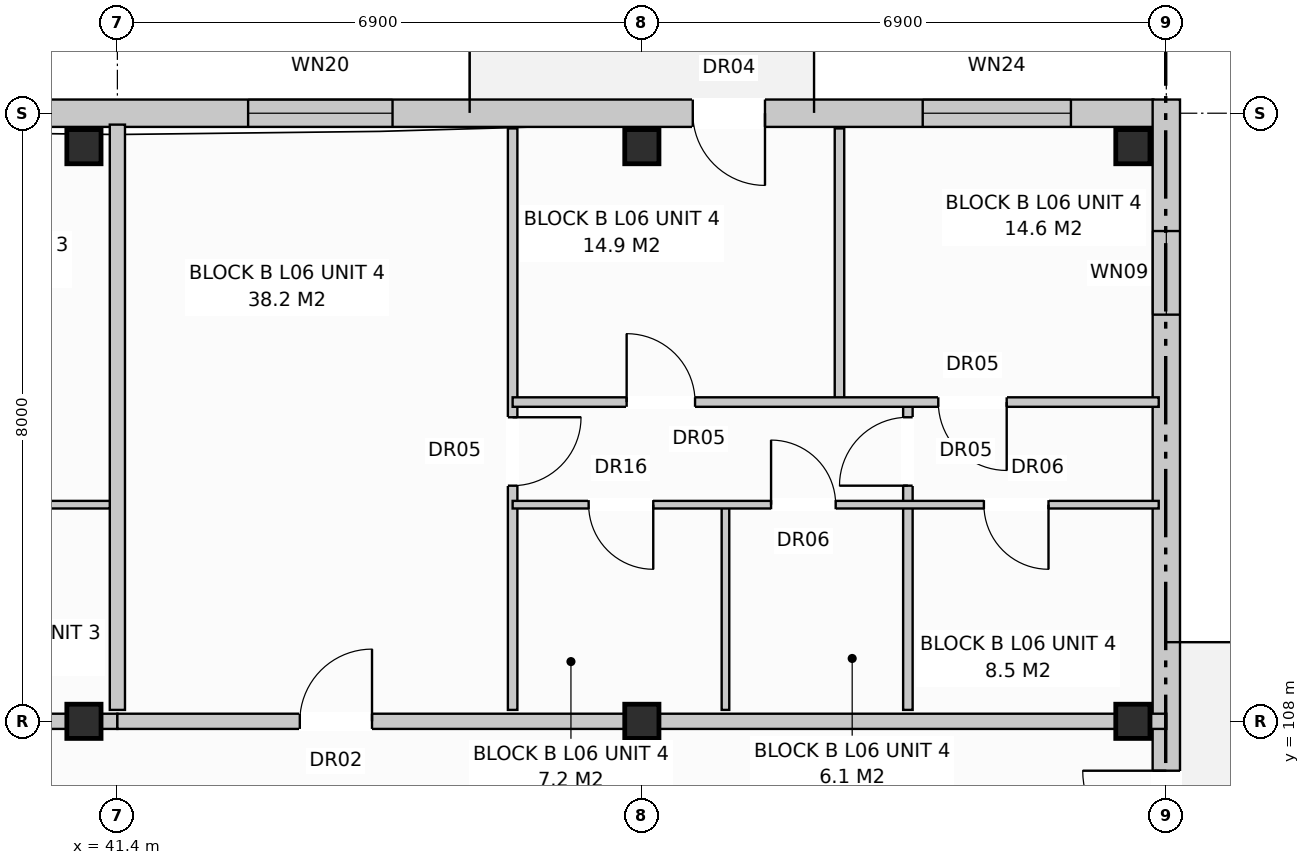
"""IFC4 building model, lengths in metres.
Left out: names, types, materials, properties, quantities, classifications, styles, units other than length and angle.
Written with IfcOpenShell. Run it as: python <this file> out.ifc"""

import sys

from ifc_helpers import new_model, si_unit, direction, frame, frame_2d, origin, origin_with_axes, origin_2d, place, context, subcontext, project, spatial, rectangle, extrude, element, fill, save


model = new_model("IFC4")
c1 = context("Model", 3, precision=1e-05, world=origin(), true_north=direction((0.0, 1.0)))
c2 = subcontext(c1, "Body", "Model", "MODEL_VIEW")
j1 = project(units=[si_unit("LENGTHUNIT", "METRE"), si_unit("PLANEANGLEUNIT", "RADIAN")], contexts=[c1])
p1 = place(None, origin())
s1 = spatial("IfcSite", under=j1, at=p1, CompositionType="ELEMENT")
p2 = place(p1, origin())
s2 = spatial("IfcBuilding", under=s1, at=p2, CompositionType="ELEMENT")
p3 = place(p2, frame((0.0, 0.0, 20.8)))
s3 = spatial("IfcBuildingStorey", under=s2, at=p3, CompositionType="ELEMENT", Elevation=20.8)
for number, where, z_axis, x_axis in (
    (1, (40.96, 108.0, 0.0), (0.0, 0.0, 1.0), (1.0, 0.0, 0.0)),
    (2, (40.96, 115.56, 0.0), (0.0, 0.0, 1.0), (1.0, 0.0, 0.0)),
    (3, (48.3, 108.0, 0.0), (0.0, 0.0, 1.0), (1.0, 0.0, 0.0)),
    (4, (48.3, 115.56, 0.0), (0.0, 0.0, 1.0), (1.0, 0.0, 0.0)),
    (5, (54.76, 108.0, 0.0), (0.0, 0.0, 1.0), (1.0, 0.0, 0.0)),
    (6, (54.76, 115.56, 0.0), (0.0, 0.0, 1.0), (1.0, 0.0, 0.0)),
):
    element("IfcColumn", number, at=place(p3, frame(where, z_axis=z_axis, x_axis=x_axis)), inside=s3, PredefinedType="COLUMN", context=c2, shape_type="SweptSolid", body=[
        extrude(rectangle(XDim=0.45, YDim=0.45, at=origin_2d()), origin(), (0.0, 0.0, 1.0), 3.2),
    ])
p4 = place(p3, frame((0.17, 116.0, 0.0), z_axis=(0.0, 0.0, 1.0), x_axis=(1.0, 0.0, 0.0)))
e7 = element("IfcWall", 7, at=p4, inside=s3, PredefinedType="STANDARD", context=c2, shape_type="SweptSolid", body=[
    extrude(rectangle(XDim=54.86, YDim=0.36, at=frame_2d((27.43, 0.0))), origin(), (0.0, 0.0, 1.0), 2.95),
])
p5 = place(p4, frame((2.804, 0.0, 0.0)))
e8 = element("IfcOpeningElement", 8, at=p5, cuts=e7, PredefinedType="OPENING", context=c2, shape_type="SweptSolid", body=[
    extrude(rectangle(XDim=0.95, YDim=2.1, at=frame_2d((0.475, 1.05))), frame((0.0, 0.192, 0.0), z_axis=(0.0, -1.0, 0.0), x_axis=(1.0, 0.0, 0.0)), (0.0, 0.0, 1.0), 0.384),
])
p6 = place(p4, frame((16.304, 0.0, 0.0)))
e9 = element("IfcOpeningElement", 9, at=p6, cuts=e7, PredefinedType="OPENING", context=c2, shape_type="SweptSolid", body=[
    extrude(rectangle(XDim=0.95, YDim=2.1, at=frame_2d((0.475, 1.05))), frame((0.0, 0.192, 0.0), z_axis=(0.0, -1.0, 0.0), x_axis=(1.0, 0.0, 0.0)), (0.0, 0.0, 1.0), 0.384),
])
p7 = place(p4, frame((30.804, 0.0, 0.0)))
e10 = element("IfcOpeningElement", 10, at=p7, cuts=e7, PredefinedType="OPENING", context=c2, shape_type="SweptSolid", body=[
    extrude(rectangle(XDim=0.95, YDim=2.1, at=frame_2d((0.475, 1.05))), frame((0.0, 0.192, 0.0), z_axis=(0.0, -1.0, 0.0), x_axis=(1.0, 0.0, 0.0)), (0.0, 0.0, 1.0), 0.384),
])
p8 = place(p4, frame((48.8, 0.0, 0.0)))
e11 = element("IfcOpeningElement", 11, at=p8, cuts=e7, PredefinedType="OPENING", context=c2, shape_type="SweptSolid", body=[
    extrude(rectangle(XDim=0.95, YDim=2.1, at=frame_2d((0.475, 1.05))), frame((0.0, 0.192, 0.0), z_axis=(0.0, -1.0, 0.0), x_axis=(1.0, 0.0, 0.0)), (0.0, 0.0, 1.0), 0.384),
])
p9 = place(p4, frame((0.65, 0.0, 0.8)))
e12 = element("IfcOpeningElement", 12, at=p9, cuts=e7, PredefinedType="OPENING", context=c2, shape_type="SweptSolid", body=[
    extrude(rectangle(XDim=1.9, YDim=1.85, at=frame_2d((0.95, 0.925))), frame((0.0, 0.192, 0.0), z_axis=(0.0, -1.0, 0.0), x_axis=(1.0, 0.0, 0.0)), (0.0, 0.0, 1.0), 0.384),
])
p10 = place(p4, frame((4.325, 0.0, 0.8)))
e13 = element("IfcOpeningElement", 13, at=p10, cuts=e7, PredefinedType="OPENING", context=c2, shape_type="SweptSolid", body=[
    extrude(rectangle(XDim=1.95, YDim=1.65, at=frame_2d((0.975, 0.825))), frame((0.0, 0.192, 0.0), z_axis=(0.0, -1.0, 0.0), x_axis=(1.0, 0.0, 0.0)), (0.0, 0.0, 1.0), 0.384),
])
p11 = place(p4, frame((10.1, 0.0, 0.8)))
e14 = element("IfcOpeningElement", 14, at=p11, cuts=e7, PredefinedType="OPENING", context=c2, shape_type="SweptSolid", body=[
    extrude(rectangle(XDim=1.8, YDim=1.7, at=frame_2d((0.9, 0.85))), frame((0.0, 0.192, 0.0), z_axis=(0.0, -1.0, 0.0), x_axis=(1.0, 0.0, 0.0)), (0.0, 0.0, 1.0), 0.384),
])
p12 = place(p4, frame((14.55, 0.0, 0.72)))
e15 = element("IfcOpeningElement", 15, at=p12, cuts=e7, PredefinedType="OPENING", context=c2, shape_type="SweptSolid", body=[
    extrude(rectangle(XDim=1.1, YDim=1.5, at=frame_2d((0.55, 0.75))), frame((0.0, 0.192, 0.0), z_axis=(0.0, -1.0, 0.0), x_axis=(1.0, 0.0, 0.0)), (0.0, 0.0, 1.0), 0.384),
])
p13 = place(p4, frame((18.025, 0.0, 0.8)))
e16 = element("IfcOpeningElement", 16, at=p13, cuts=e7, PredefinedType="OPENING", context=c2, shape_type="SweptSolid", body=[
    extrude(rectangle(XDim=1.95, YDim=1.65, at=frame_2d((0.975, 0.825))), frame((0.0, 0.192, 0.0), z_axis=(0.0, -1.0, 0.0), x_axis=(1.0, 0.0, 0.0)), (0.0, 0.0, 1.0), 0.384),
])
p14 = place(p4, frame((22.8, 0.0, 0.8)))
e17 = element("IfcOpeningElement", 17, at=p14, cuts=e7, PredefinedType="OPENING", context=c2, shape_type="SweptSolid", body=[
    extrude(rectangle(XDim=1.8, YDim=1.7, at=frame_2d((0.9, 0.85))), frame((0.0, 0.192, 0.0), z_axis=(0.0, -1.0, 0.0), x_axis=(1.0, 0.0, 0.0)), (0.0, 0.0, 1.0), 0.384),
])
p15 = place(p4, frame((28.85, 0.0, 0.72)))
e18 = element("IfcOpeningElement", 18, at=p15, cuts=e7, PredefinedType="OPENING", context=c2, shape_type="SweptSolid", body=[
    extrude(rectangle(XDim=1.1, YDim=1.5, at=frame_2d((0.55, 0.75))), frame((0.0, 0.192, 0.0), z_axis=(0.0, -1.0, 0.0), x_axis=(1.0, 0.0, 0.0)), (0.0, 0.0, 1.0), 0.384),
])
p16 = place(p4, frame((34.825, 0.0, 0.8)))
e19 = element("IfcOpeningElement", 19, at=p16, cuts=e7, PredefinedType="OPENING", context=c2, shape_type="SweptSolid", body=[
    extrude(rectangle(XDim=1.95, YDim=1.65, at=frame_2d((0.975, 0.825))), frame((0.0, 0.192, 0.0), z_axis=(0.0, -1.0, 0.0), x_axis=(1.0, 0.0, 0.0)), (0.0, 0.0, 1.0), 0.384),
])
p17 = place(p4, frame((38.3, 0.0, 0.8)))
e20 = element("IfcOpeningElement", 20, at=p17, cuts=e7, PredefinedType="OPENING", context=c2, shape_type="SweptSolid", body=[
    extrude(rectangle(XDim=1.8, YDim=1.7, at=frame_2d((0.9, 0.85))), frame((0.0, 0.192, 0.0), z_axis=(0.0, -1.0, 0.0), x_axis=(1.0, 0.0, 0.0)), (0.0, 0.0, 1.0), 0.384),
])
p18 = place(p4, frame((42.95, 0.0, 0.8)))
e21 = element("IfcOpeningElement", 21, at=p18, cuts=e7, PredefinedType="OPENING", context=c2, shape_type="SweptSolid", body=[
    extrude(rectangle(XDim=1.9, YDim=1.85, at=frame_2d((0.95, 0.925))), frame((0.0, 0.192, 0.0), z_axis=(0.0, -1.0, 0.0), x_axis=(1.0, 0.0, 0.0)), (0.0, 0.0, 1.0), 0.384),
])
p19 = place(p4, frame((51.825, 0.0, 0.8)))
e22 = element("IfcOpeningElement", 22, at=p19, cuts=e7, PredefinedType="OPENING", context=c2, shape_type="SweptSolid", body=[
    extrude(rectangle(XDim=1.95, YDim=1.65, at=frame_2d((0.975, 0.825))), frame((0.0, 0.192, 0.0), z_axis=(0.0, -1.0, 0.0), x_axis=(1.0, 0.0, 0.0)), (0.0, 0.0, 1.0), 0.384),
])
p20 = place(p3, frame((55.2, 97.42, 0.0), z_axis=(0.0, 0.0, 1.0), x_axis=(0.0, 1.0, 0.0)))
e23 = element("IfcWall", 23, at=p20, inside=s3, PredefinedType="STANDARD", context=c2, shape_type="SweptSolid", body=[
    extrude(rectangle(XDim=18.76, YDim=0.36, at=frame_2d((9.38, 0.0))), origin(), (0.0, 0.0, 1.0), 2.95),
])
p21 = place(p20, frame((8.83, 0.0, 0.0)))
e24 = element("IfcOpeningElement", 24, at=p21, cuts=e23, PredefinedType="OPENING", context=c2, shape_type="SweptSolid", body=[
    extrude(rectangle(XDim=1.1, YDim=2.1, at=frame_2d((0.55, 1.05))), frame((0.0, 0.192, 0.0), z_axis=(0.0, -1.0, 0.0), x_axis=(1.0, 0.0, 0.0)), (0.0, 0.0, 1.0), 0.384),
])
p22 = place(p20, frame((1.73, 0.0, 0.72)))
e25 = element("IfcOpeningElement", 25, at=p22, cuts=e23, PredefinedType="OPENING", context=c2, shape_type="SweptSolid", body=[
    extrude(rectangle(XDim=1.1, YDim=1.5, at=frame_2d((0.55, 0.75))), frame((0.0, 0.192, 0.0), z_axis=(0.0, -1.0, 0.0), x_axis=(1.0, 0.0, 0.0)), (0.0, 0.0, 1.0), 0.384),
])
p23 = place(p20, frame((15.93, 0.0, 0.72)))
e26 = element("IfcOpeningElement", 26, at=p23, cuts=e23, PredefinedType="OPENING", context=c2, shape_type="SweptSolid", body=[
    extrude(rectangle(XDim=1.1, YDim=1.5, at=frame_2d((0.55, 0.75))), frame((0.0, 0.192, 0.0), z_axis=(0.0, -1.0, 0.0), x_axis=(1.0, 0.0, 0.0)), (0.0, 0.0, 1.0), 0.384),
])
p24 = place(p3, frame((41.4, 108.15, 0.0), z_axis=(0.0, 0.0, 1.0), x_axis=(0.0, 1.0, 0.0)))
e27 = element("IfcWall", 27, at=p24, inside=s3, PredefinedType="PARTITIONING", context=c2, shape_type="SweptSolid", body=[
    extrude(rectangle(XDim=7.7, YDim=0.2, at=frame_2d((3.85, 0.0))), origin(), (0.0, 0.0, 1.0), 2.39),
])
p25 = place(p3, frame((20.7, 108.0, 0.0), z_axis=(0.0, 0.0, 1.0), x_axis=(1.0, 0.0, 0.0)))
e28 = element("IfcWall", 28, at=p25, inside=s3, PredefinedType="PARTITIONING", context=c2, shape_type="SweptSolid", body=[
    extrude(rectangle(XDim=20.7, YDim=0.2, at=frame_2d((10.35, 0.0))), origin(), (0.0, 0.0, 1.0), 2.39),
])
p26 = place(p25, frame((2.4, 0.0, 0.0)))
e29 = element("IfcOpeningElement", 29, at=p26, cuts=e28, PredefinedType="OPENING", context=c2, shape_type="SweptSolid", body=[
    extrude(rectangle(XDim=0.95, YDim=2.15, at=frame_2d((0.475, 1.075))), frame((0.0, 0.112, 0.0), z_axis=(0.0, -1.0, 0.0), x_axis=(1.0, 0.0, 0.0)), (0.0, 0.0, 1.0), 0.224),
])
p27 = place(p3, frame((27.0, 110.85, 0.0), z_axis=(0.0, 0.0, 1.0), x_axis=(1.0, 0.0, 0.0)))
e30 = element("IfcWall", 30, at=p27, inside=s3, PredefinedType="PARTITIONING", context=c2, shape_type="SweptSolid", body=[
    extrude(rectangle(XDim=14.3, YDim=0.1, at=frame_2d((7.15, 0.0))), origin(), (0.0, 0.0, 1.0), 2.95),
])
p28 = place(p27, frame((1.6, 0.0, 0.0)))
e31 = element("IfcOpeningElement", 31, at=p28, cuts=e30, PredefinedType="OPENING", context=c2, shape_type="SweptSolid", body=[
    extrude(rectangle(XDim=0.9, YDim=2.1, at=frame_2d((0.45, 1.05))), frame((0.0, 0.062, 0.0), z_axis=(0.0, -1.0, 0.0), x_axis=(1.0, 0.0, 0.0)), (0.0, 0.0, 1.0), 0.124),
])
p29 = place(p27, frame((5.1, 0.0, 0.0)))
e32 = element("IfcOpeningElement", 32, at=p29, cuts=e30, PredefinedType="OPENING", context=c2, shape_type="SweptSolid", body=[
    extrude(rectangle(XDim=0.85, YDim=2.05, at=frame_2d((0.425, 1.025))), frame((0.0, 0.062, 0.0), z_axis=(0.0, -1.0, 0.0), x_axis=(1.0, 0.0, 0.0)), (0.0, 0.0, 1.0), 0.124),
])
p30 = place(p27, frame((8.2, 0.0, 0.0)))
e33 = element("IfcOpeningElement", 33, at=p30, cuts=e30, PredefinedType="OPENING", context=c2, shape_type="SweptSolid", body=[
    extrude(rectangle(XDim=0.85, YDim=2.05, at=frame_2d((0.425, 1.025))), frame((0.0, 0.062, 0.0), z_axis=(0.0, -1.0, 0.0), x_axis=(1.0, 0.0, 0.0)), (0.0, 0.0, 1.0), 0.124),
])
p31 = place(p27, frame((11.6, 0.0, 0.0)))
e34 = element("IfcOpeningElement", 34, at=p31, cuts=e30, PredefinedType="OPENING", context=c2, shape_type="SweptSolid", body=[
    extrude(rectangle(XDim=0.85, YDim=2.05, at=frame_2d((0.425, 1.025))), frame((0.0, 0.062, 0.0), z_axis=(0.0, -1.0, 0.0), x_axis=(1.0, 0.0, 0.0)), (0.0, 0.0, 1.0), 0.124),
])
p32 = place(p3, frame((41.4, 108.0, 0.0), z_axis=(0.0, 0.0, 1.0), x_axis=(1.0, 0.0, 0.0)))
e35 = element("IfcWall", 35, at=p32, inside=s3, PredefinedType="PARTITIONING", context=c2, shape_type="SweptSolid", body=[
    extrude(rectangle(XDim=13.8, YDim=0.2, at=frame_2d((6.9, 0.0))), origin(), (0.0, 0.0, 1.0), 2.39),
])
p33 = place(p32, frame((2.4, 0.0, 0.0)))
e36 = element("IfcOpeningElement", 36, at=p33, cuts=e35, PredefinedType="OPENING", context=c2, shape_type="SweptSolid", body=[
    extrude(rectangle(XDim=0.95, YDim=2.15, at=frame_2d((0.475, 1.075))), frame((0.0, 0.112, 0.0), z_axis=(0.0, -1.0, 0.0), x_axis=(1.0, 0.0, 0.0)), (0.0, 0.0, 1.0), 0.224),
])
p34 = place(p3, frame((46.6, 108.15, 0.0), z_axis=(0.0, 0.0, 1.0), x_axis=(0.0, 1.0, 0.0)))
e37 = element("IfcWall", 37, at=p34, inside=s3, PredefinedType="PARTITIONING", context=c2, shape_type="SweptSolid", body=[
    extrude(rectangle(XDim=7.65, YDim=0.125, at=frame_2d((3.825, 0.0))), origin(), (0.0, 0.0, 1.0), 2.95),
])
p35 = place(p34, frame((2.95, 0.0, 0.0)))
e38 = element("IfcOpeningElement", 38, at=p35, cuts=e37, PredefinedType="OPENING", context=c2, shape_type="SweptSolid", body=[
    extrude(rectangle(XDim=0.9, YDim=2.1, at=frame_2d((0.45, 1.05))), frame((0.0, 0.074, 0.0), z_axis=(0.0, -1.0, 0.0), x_axis=(1.0, 0.0, 0.0)), (0.0, 0.0, 1.0), 0.149),
])
p36 = place(p3, frame((49.4, 108.15, 0.0), z_axis=(0.0, 0.0, 1.0), x_axis=(0.0, 1.0, 0.0)))
e39 = element("IfcWall", 39, at=p36, inside=s3, PredefinedType="PARTITIONING", context=c2, shape_type="SweptSolid", body=[
    extrude(rectangle(XDim=2.7, YDim=0.1, at=frame_2d((1.35, 0.0))), origin(), (0.0, 0.0, 1.0), 2.59),
])
p37 = place(p3, frame((51.8, 108.15, 0.0), z_axis=(0.0, 0.0, 1.0), x_axis=(0.0, 1.0, 0.0)))
e40 = element("IfcWall", 40, at=p37, inside=s3, PredefinedType="PARTITIONING", context=c2, shape_type="SweptSolid", body=[
    extrude(rectangle(XDim=4.05, YDim=0.125, at=frame_2d((2.025, 0.0))), origin(), (0.0, 0.0, 1.0), 2.95),
])
p38 = place(p37, frame((2.95, 0.0, 0.0)))
e41 = element("IfcOpeningElement", 41, at=p38, cuts=e40, PredefinedType="OPENING", context=c2, shape_type="SweptSolid", body=[
    extrude(rectangle(XDim=0.9, YDim=2.1, at=frame_2d((0.45, 1.05))), frame((0.0, 0.074, 0.0), z_axis=(0.0, -1.0, 0.0), x_axis=(1.0, 0.0, 0.0)), (0.0, 0.0, 1.0), 0.149),
])
p39 = place(p3, frame((50.9, 112.2, 0.0), z_axis=(0.0, 0.0, 1.0), x_axis=(0.0, 1.0, 0.0)))
e42 = element("IfcWall", 42, at=p39, inside=s3, PredefinedType="PARTITIONING", context=c2, shape_type="SweptSolid", body=[
    extrude(rectangle(XDim=3.6, YDim=0.125, at=frame_2d((1.8, 0.0))), origin(), (0.0, 0.0, 1.0), 2.95),
])
p40 = place(p3, frame((46.6, 110.85, 0.0), z_axis=(0.0, 0.0, 1.0), x_axis=(1.0, 0.0, 0.0)))
e43 = element("IfcWall", 43, at=p40, inside=s3, PredefinedType="PARTITIONING", context=c2, shape_type="SweptSolid", body=[
    extrude(rectangle(XDim=8.5, YDim=0.1, at=frame_2d((4.25, 0.0))), origin(), (0.0, 0.0, 1.0), 2.95),
])
p41 = place(p40, frame((1.0, 0.0, 0.0)))
e44 = element("IfcOpeningElement", 44, at=p41, cuts=e43, PredefinedType="OPENING", context=c2, shape_type="SweptSolid", body=[
    extrude(rectangle(XDim=0.85, YDim=2.1, at=frame_2d((0.425, 1.05))), frame((0.0, 0.062, 0.0), z_axis=(0.0, -1.0, 0.0), x_axis=(1.0, 0.0, 0.0)), (0.0, 0.0, 1.0), 0.124),
])
p42 = place(p40, frame((3.4, 0.0, 0.0)))
e45 = element("IfcOpeningElement", 45, at=p42, cuts=e43, PredefinedType="OPENING", context=c2, shape_type="SweptSolid", body=[
    extrude(rectangle(XDim=0.85, YDim=2.05, at=frame_2d((0.425, 1.025))), frame((0.0, 0.062, 0.0), z_axis=(0.0, -1.0, 0.0), x_axis=(1.0, 0.0, 0.0)), (0.0, 0.0, 1.0), 0.124),
])
p43 = place(p40, frame((6.2, 0.0, 0.0)))
e46 = element("IfcOpeningElement", 46, at=p43, cuts=e43, PredefinedType="OPENING", context=c2, shape_type="SweptSolid", body=[
    extrude(rectangle(XDim=0.85, YDim=2.05, at=frame_2d((0.425, 1.025))), frame((0.0, 0.062, 0.0), z_axis=(0.0, -1.0, 0.0), x_axis=(1.0, 0.0, 0.0)), (0.0, 0.0, 1.0), 0.124),
])
p44 = place(p3, frame((46.6, 112.2, 0.0), z_axis=(0.0, 0.0, 1.0), x_axis=(1.0, 0.0, 0.0)))
e47 = element("IfcWall", 47, at=p44, inside=s3, PredefinedType="PARTITIONING", context=c2, shape_type="SweptSolid", body=[
    extrude(rectangle(XDim=8.5, YDim=0.125, at=frame_2d((4.25, 0.0))), origin(), (0.0, 0.0, 1.0), 2.95),
])
p45 = place(p44, frame((1.5, 0.0, 0.0)))
e48 = element("IfcOpeningElement", 48, at=p45, cuts=e47, PredefinedType="OPENING", context=c2, shape_type="SweptSolid", body=[
    extrude(rectangle(XDim=0.9, YDim=2.1, at=frame_2d((0.45, 1.05))), frame((0.0, 0.074, 0.0), z_axis=(0.0, -1.0, 0.0), x_axis=(1.0, 0.0, 0.0)), (0.0, 0.0, 1.0), 0.149),
])
p46 = place(p44, frame((5.6, 0.0, 0.0)))
e49 = element("IfcOpeningElement", 49, at=p46, cuts=e47, PredefinedType="OPENING", context=c2, shape_type="SweptSolid", body=[
    extrude(rectangle(XDim=0.9, YDim=2.1, at=frame_2d((0.45, 1.05))), frame((0.0, 0.074, 0.0), z_axis=(0.0, -1.0, 0.0), x_axis=(1.0, 0.0, 0.0)), (0.0, 0.0, 1.0), 0.149),
])
p47 = place(p8, frame((0.95, 0.0, 0.0), z_axis=(0.0, 0.0, 1.0), x_axis=(-1.0, 0.0, 0.0)))
e50 = element("IfcDoor", 50, at=p47, inside=s3, OperationType="SINGLE_SWING_RIGHT", PredefinedType="DOOR", context=c2, shape_type="SweptSolid", body=[
    extrude(rectangle(XDim=0.95, YDim=2.1, at=frame_2d((0.475, 1.05))), frame((0.0, 0.025, 0.0), z_axis=(0.0, -1.0, 0.0), x_axis=(1.0, 0.0, 0.0)), (0.0, 0.0, 1.0), 0.05),
])
fill(e11, e50)
p48 = place(p18, origin_with_axes())
e51 = element("IfcWindow", 51, at=p48, inside=s3, PartitioningType="SINGLE_PANEL", PredefinedType="WINDOW", context=c2, shape_type="SweptSolid", body=[
    extrude(rectangle(XDim=1.9, YDim=1.85, at=frame_2d((0.95, 0.925))), frame((0.0, 0.03, 0.0), z_axis=(0.0, -1.0, 0.0), x_axis=(1.0, 0.0, 0.0)), (0.0, 0.0, 1.0), 0.06),
])
fill(e21, e51)
p49 = place(p19, origin_with_axes())
e52 = element("IfcWindow", 52, at=p49, inside=s3, PartitioningType="SINGLE_PANEL", PredefinedType="WINDOW", context=c2, shape_type="SweptSolid", body=[
    extrude(rectangle(XDim=1.95, YDim=1.65, at=frame_2d((0.975, 0.825))), frame((0.0, 0.03, 0.0), z_axis=(0.0, -1.0, 0.0), x_axis=(1.0, 0.0, 0.0)), (0.0, 0.0, 1.0), 0.06),
])
fill(e22, e52)
p50 = place(p21, origin_with_axes())
e53 = element("IfcDoor", 53, at=p50, inside=s3, OperationType="SINGLE_SWING_RIGHT", PredefinedType="DOOR", context=c2, shape_type="SweptSolid", body=[
    extrude(rectangle(XDim=1.1, YDim=2.1, at=frame_2d((0.55, 1.05))), frame((0.0, 0.025, 0.0), z_axis=(0.0, -1.0, 0.0), x_axis=(1.0, 0.0, 0.0)), (0.0, 0.0, 1.0), 0.05),
])
fill(e24, e53)
p51 = place(p23, origin_with_axes())
e54 = element("IfcWindow", 54, at=p51, inside=s3, PartitioningType="SINGLE_PANEL", PredefinedType="WINDOW", context=c2, shape_type="SweptSolid", body=[
    extrude(rectangle(XDim=1.1, YDim=1.5, at=frame_2d((0.55, 0.75))), frame((0.0, 0.03, 0.0), z_axis=(0.0, -1.0, 0.0), x_axis=(1.0, 0.0, 0.0)), (0.0, 0.0, 1.0), 0.06),
])
fill(e26, e54)
p52 = place(p33, origin_with_axes())
e55 = element("IfcDoor", 55, at=p52, inside=s3, OperationType="SINGLE_SWING_RIGHT", PredefinedType="DOOR", context=c2, shape_type="SweptSolid", body=[
    extrude(rectangle(XDim=0.95, YDim=2.15, at=frame_2d((0.475, 1.075))), frame((0.0, 0.025, 0.0), z_axis=(0.0, -1.0, 0.0), x_axis=(1.0, 0.0, 0.0)), (0.0, 0.0, 1.0), 0.05),
])
fill(e36, e55)
p53 = place(p35, frame((0.9, 0.0, 0.0), z_axis=(0.0, 0.0, 1.0), x_axis=(-1.0, 0.0, 0.0)))
e56 = element("IfcDoor", 56, at=p53, inside=s3, OperationType="SINGLE_SWING_RIGHT", PredefinedType="DOOR", context=c2, shape_type="SweptSolid", body=[
    extrude(rectangle(XDim=0.9, YDim=2.1, at=frame_2d((0.45, 1.05))), frame((0.0, 0.025, 0.0), z_axis=(0.0, -1.0, 0.0), x_axis=(1.0, 0.0, 0.0)), (0.0, 0.0, 1.0), 0.05),
])
fill(e38, e56)
p54 = place(p38, origin_with_axes())
e57 = element("IfcDoor", 57, at=p54, inside=s3, OperationType="SINGLE_SWING_LEFT", PredefinedType="DOOR", context=c2, shape_type="SweptSolid", body=[
    extrude(rectangle(XDim=0.9, YDim=2.1, at=frame_2d((0.45, 1.05))), frame((0.0, 0.025, 0.0), z_axis=(0.0, -1.0, 0.0), x_axis=(1.0, 0.0, 0.0)), (0.0, 0.0, 1.0), 0.05),
])
fill(e41, e57)
p55 = place(p41, frame((0.85, 0.0, 0.0), z_axis=(0.0, 0.0, 1.0), x_axis=(-1.0, 0.0, 0.0)))
e58 = element("IfcDoor", 58, at=p55, inside=s3, OperationType="SINGLE_SWING_RIGHT", PredefinedType="DOOR", context=c2, shape_type="SweptSolid", body=[
    extrude(rectangle(XDim=0.85, YDim=2.1, at=frame_2d((0.425, 1.05))), frame((0.0, 0.025, 0.0), z_axis=(0.0, -1.0, 0.0), x_axis=(1.0, 0.0, 0.0)), (0.0, 0.0, 1.0), 0.05),
])
fill(e44, e58)
p56 = place(p42, origin_with_axes())
e59 = element("IfcDoor", 59, at=p56, inside=s3, OperationType="SINGLE_SWING_LEFT", PredefinedType="DOOR", context=c2, shape_type="SweptSolid", body=[
    extrude(rectangle(XDim=0.85, YDim=2.05, at=frame_2d((0.425, 1.025))), frame((0.0, 0.025, 0.0), z_axis=(0.0, -1.0, 0.0), x_axis=(1.0, 0.0, 0.0)), (0.0, 0.0, 1.0), 0.05),
])
fill(e45, e59)
p57 = place(p43, frame((0.85, 0.0, 0.0), z_axis=(0.0, 0.0, 1.0), x_axis=(-1.0, 0.0, 0.0)))
e60 = element("IfcDoor", 60, at=p57, inside=s3, OperationType="SINGLE_SWING_RIGHT", PredefinedType="DOOR", context=c2, shape_type="SweptSolid", body=[
    extrude(rectangle(XDim=0.85, YDim=2.05, at=frame_2d((0.425, 1.025))), frame((0.0, 0.025, 0.0), z_axis=(0.0, -1.0, 0.0), x_axis=(1.0, 0.0, 0.0)), (0.0, 0.0, 1.0), 0.05),
])
fill(e46, e60)
p58 = place(p45, origin_with_axes())
e61 = element("IfcDoor", 61, at=p58, inside=s3, OperationType="SINGLE_SWING_LEFT", PredefinedType="DOOR", context=c2, shape_type="SweptSolid", body=[
    extrude(rectangle(XDim=0.9, YDim=2.1, at=frame_2d((0.45, 1.05))), frame((0.0, 0.025, 0.0), z_axis=(0.0, -1.0, 0.0), x_axis=(1.0, 0.0, 0.0)), (0.0, 0.0, 1.0), 0.05),
])
fill(e48, e61)
p59 = place(p46, frame((0.9, 0.0, 0.0), z_axis=(0.0, 0.0, 1.0), x_axis=(-1.0, 0.0, 0.0)))
e62 = element("IfcDoor", 62, at=p59, inside=s3, OperationType="SINGLE_SWING_RIGHT", PredefinedType="DOOR", context=c2, shape_type="SweptSolid", body=[
    extrude(rectangle(XDim=0.9, YDim=2.1, at=frame_2d((0.45, 1.05))), frame((0.0, 0.025, 0.0), z_axis=(0.0, -1.0, 0.0), x_axis=(1.0, 0.0, 0.0)), (0.0, 0.0, 1.0), 0.05),
])
fill(e49, e62)
save(model, sys.argv[1])
